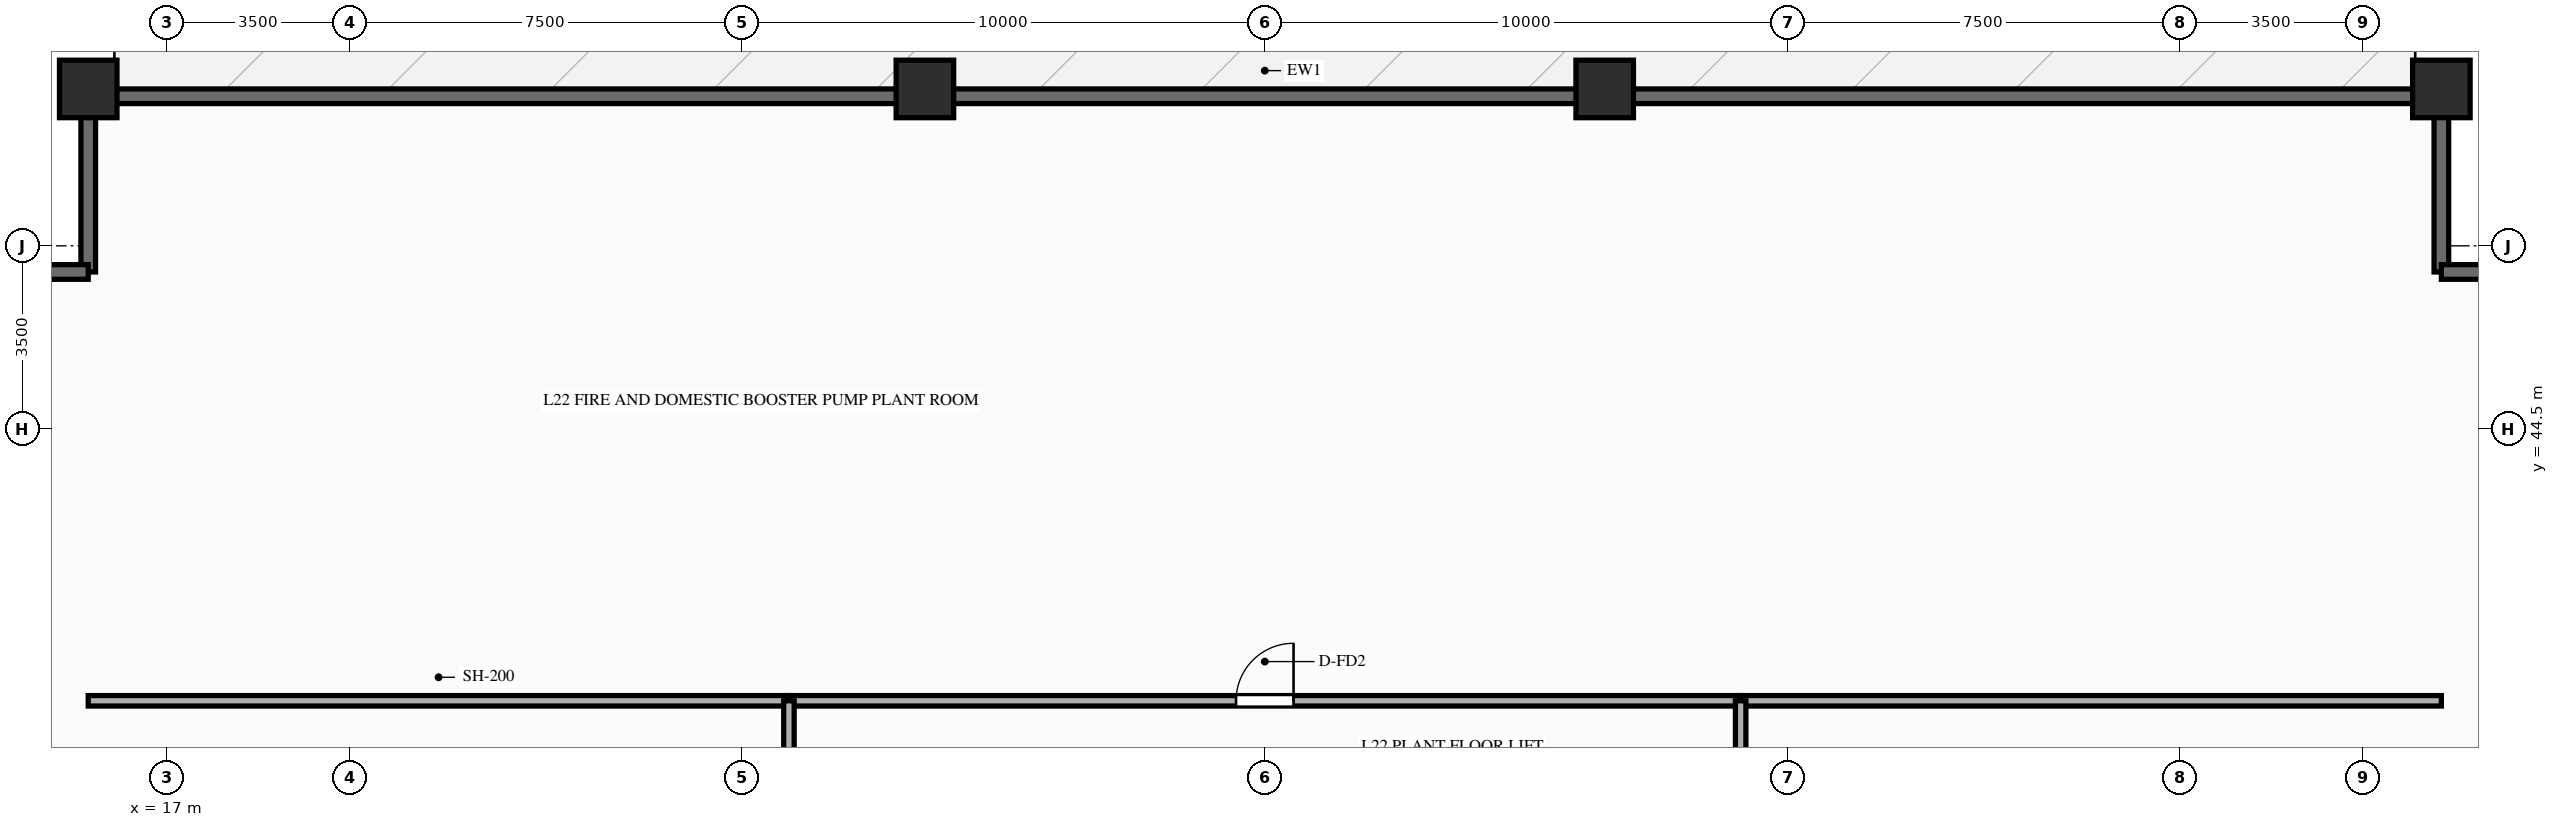
"""IFC4 building model, lengths in metres.
Left out: names, types, materials, properties, quantities, classifications, styles, units other than length and angle.
Written with IfcOpenShell. Run it as: python <this file> out.ifc"""

import sys

from ifc_helpers import new_model, si_unit, direction, frame, frame_2d, origin, origin_2d, place, context, subcontext, project, spatial, rectangle, extrude, source, transform, mapped, element, fill, save


model = new_model("IFC4")
c1 = context("Model", 3, precision=1e-05, world=origin(), true_north=direction((0.0, 1.0)))
c2 = subcontext(c1, "Body", "Model", "MODEL_VIEW")
j1 = project(units=[si_unit("LENGTHUNIT", "METRE"), si_unit("PLANEANGLEUNIT", "RADIAN")], contexts=[c1])
p1 = place(None, origin())
s1 = spatial("IfcSite", under=j1, at=p1, CompositionType="ELEMENT")
p2 = place(p1, origin())
s2 = spatial("IfcBuilding", under=s1, at=p2, CompositionType="ELEMENT")
p3 = place(p2, frame((0.0, 0.0, 70.4)))
s3 = spatial("IfcBuildingStorey", under=s2, at=p3, CompositionType="ELEMENT", Elevation=70.4)
m1 = source(origin(), c2, "Body", "SweptSolid", [
    extrude(rectangle(XDim=1.1, YDim=1.1, at=origin_2d()), origin(), (0.0, 0.0, 1.0), 3.95),
])
for number, where, z_axis, x_axis in (
    (1, (60.5, 51.0, 0.0), (0.0, 0.0, 1.0), (1.0, 0.0, 0.0)),
    (2, (44.5, 51.0, 0.0), (0.0, 0.0, 1.0), (1.0, 0.0, 0.0)),
    (3, (31.5, 51.0, 0.0), (0.0, 0.0, 1.0), (1.0, 0.0, 0.0)),
    (4, (15.5, 51.0, 0.0), (0.0, 0.0, 1.0), (1.0, 0.0, 0.0)),
):
    element("IfcColumn", number, at=place(p3, frame(where, z_axis=z_axis, x_axis=x_axis)), inside=s3, PredefinedType="COLUMN", context=c2, shape_type="MappedRepresentation", body=[
        mapped(m1, transform((0.0, 0.0, 0.0), scale=1.0)),
    ])
p4 = place(p3, frame((15.5, 50.86, 0.0), z_axis=(0.0, 0.0, 1.0), x_axis=(1.0, 0.0, 0.0)))
e5 = element("IfcWall", 5, at=p4, inside=s3, PredefinedType="SOLIDWALL", context=c2, shape_type="SweptSolid", body=[
    extrude(rectangle(XDim=45.0, YDim=0.28, at=frame_2d((22.5, 0.0))), origin(), (0.0, 0.0, 1.0), 2.29),
])
for number, where, z_axis, x_axis in (
    (6, (15.5, 47.5, 0.0), (0.0, 0.0, 1.0), (0.0, 1.0, 0.0)),
    (7, (12.0, 47.5, 0.0), (0.0, 0.0, 1.0), (1.0, 0.0, 0.0)),
    (8, (60.5, 47.5, 0.0), (0.0, 0.0, 1.0), (0.0, 1.0, 0.0)),
    (9, (60.5, 47.5, 0.0), (0.0, 0.0, 1.0), (1.0, 0.0, 0.0)),
):
    element("IfcWall", number, at=place(p3, frame(where, z_axis=z_axis, x_axis=x_axis)), inside=s3, PredefinedType="SOLIDWALL", context=c2, shape_type="SweptSolid", body=[
        extrude(rectangle(XDim=3.5, YDim=0.28, at=frame_2d((1.75, 0.0))), origin(), (0.0, 0.0, 1.0), 2.29),
    ])
p5 = place(p3, frame((15.5, 39.3, 0.0), z_axis=(0.0, 0.0, 1.0), x_axis=(1.0, 0.0, 0.0)))
e10 = element("IfcWall", 10, at=p5, inside=s3, PredefinedType="PARTITIONING", context=c2, shape_type="SweptSolid", body=[
    extrude(rectangle(XDim=13.4, YDim=0.2, at=frame_2d((6.7, 0.0))), origin(), (0.0, 0.0, 1.0), 3.61),
])
p6 = place(p3, frame((28.9, 39.3, 0.0), z_axis=(0.0, 0.0, 1.0), x_axis=(1.0, 0.0, 0.0)))
e11 = element("IfcWall", 11, at=p6, inside=s3, PredefinedType="PARTITIONING", context=c2, shape_type="SweptSolid", body=[
    extrude(rectangle(XDim=18.2, YDim=0.2, at=frame_2d((9.1, 0.0))), origin(), (0.0, 0.0, 1.0), 3.61),
])
p7 = place(p6, frame((8.55, 0.0, 0.0)))
e12 = element("IfcOpeningElement", 12, at=p7, cuts=e11, PredefinedType="OPENING", context=c2, shape_type="SweptSolid", body=[
    extrude(rectangle(XDim=1.1, YDim=2.15, at=frame_2d((0.55, 1.075))), frame((0.0, 0.112, 0.0), z_axis=(0.0, -1.0, 0.0), x_axis=(1.0, 0.0, 0.0)), (0.0, 0.0, 1.0), 0.224),
])
p8 = place(p3, frame((47.1, 39.3, 0.0), z_axis=(0.0, 0.0, 1.0), x_axis=(1.0, 0.0, 0.0)))
e13 = element("IfcWall", 13, at=p8, inside=s3, PredefinedType="PARTITIONING", context=c2, shape_type="SweptSolid", body=[
    extrude(rectangle(XDim=13.4, YDim=0.2, at=frame_2d((6.7, 0.0))), origin(), (0.0, 0.0, 1.0), 3.61),
])
p9 = place(p3, frame((28.9, 14.5, 0.0), z_axis=(0.0, 0.0, 1.0), x_axis=(0.0, 1.0, 0.0)))
e14 = element("IfcWall", 14, at=p9, inside=s3, PredefinedType="PARTITIONING", context=c2, shape_type="SweptSolid", body=[
    extrude(rectangle(XDim=24.8, YDim=0.2, at=frame_2d((12.4, 0.0))), origin(), (0.0, 0.0, 1.0), 3.61),
])
p10 = place(p9, frame((11.85, 0.0, 0.0)))
e15 = element("IfcOpeningElement", 15, at=p10, cuts=e14, PredefinedType="OPENING", context=c2, shape_type="SweptSolid", body=[
    extrude(rectangle(XDim=1.1, YDim=2.15, at=frame_2d((0.55, 1.075))), frame((0.0, 0.112, 0.0), z_axis=(0.0, -1.0, 0.0), x_axis=(1.0, 0.0, 0.0)), (0.0, 0.0, 1.0), 0.224),
])
p11 = place(p3, frame((47.1, 14.5, 0.0), z_axis=(0.0, 0.0, 1.0), x_axis=(0.0, 1.0, 0.0)))
e16 = element("IfcWall", 16, at=p11, inside=s3, PredefinedType="PARTITIONING", context=c2, shape_type="SweptSolid", body=[
    extrude(rectangle(XDim=24.8, YDim=0.2, at=frame_2d((12.4, 0.0))), origin(), (0.0, 0.0, 1.0), 3.61),
])
p12 = place(p11, frame((11.85, 0.0, 0.0)))
e17 = element("IfcOpeningElement", 17, at=p12, cuts=e16, PredefinedType="OPENING", context=c2, shape_type="SweptSolid", body=[
    extrude(rectangle(XDim=1.1, YDim=2.15, at=frame_2d((0.55, 1.075))), frame((0.0, 0.112, 0.0), z_axis=(0.0, -1.0, 0.0), x_axis=(1.0, 0.0, 0.0)), (0.0, 0.0, 1.0), 0.224),
])
m2 = source(origin(), c2, "Body", "SweptSolid", [
    extrude(rectangle(XDim=1.1, YDim=2.15, at=frame_2d((0.55, 1.075))), frame((0.0, 0.025, 0.0), z_axis=(0.0, -1.0, 0.0), x_axis=(1.0, 0.0, 0.0)), (0.0, 0.0, 1.0), 0.05),
])
p13 = place(p7, origin())
e18 = element("IfcDoor", 18, at=p13, inside=s3, OperationType="SINGLE_SWING_RIGHT", PredefinedType="DOOR", context=c2, shape_type="MappedRepresentation", body=[
    mapped(m2, transform((0.0, 0.0, 0.0), scale=1.0)),
])
fill(e12, e18)
save(model, sys.argv[1])
